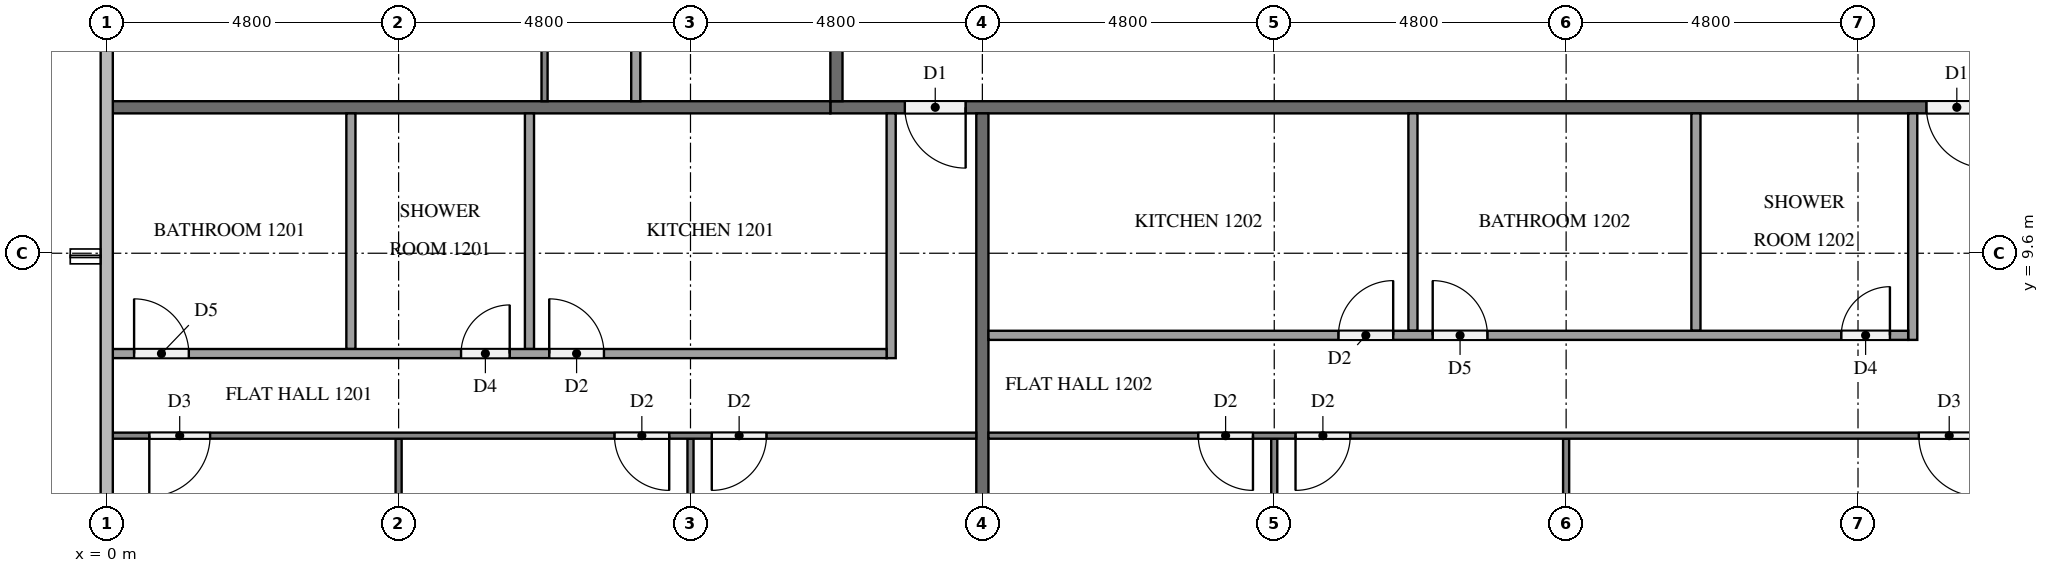
"""IFC4 building model, lengths in metres.
Left out: names, types, materials, properties, quantities, classifications, styles, units other than length and angle.
Written with IfcOpenShell. Run it as: python <this file> out.ifc"""

import sys

from ifc_helpers import new_model, si_unit, direction, frame, frame_2d, origin, place, context, subcontext, project, spatial, rectangle, extrude, element, fill, save


model = new_model("IFC4")
c1 = context("Model", 3, precision=1e-05, world=origin(), true_north=direction((0.0, 1.0)))
c2 = subcontext(c1, "Body", "Model", "MODEL_VIEW")
j1 = project(units=[si_unit("LENGTHUNIT", "METRE"), si_unit("PLANEANGLEUNIT", "RADIAN")], contexts=[c1])
p1 = place(None, origin())
s1 = spatial("IfcSite", under=j1, at=p1, CompositionType="ELEMENT")
p2 = place(p1, origin())
s2 = spatial("IfcBuilding", under=s1, at=p2, CompositionType="ELEMENT")
p3 = place(p2, frame((0.0, 0.0, 50.4)))
s3 = spatial("IfcBuildingStorey", under=s2, at=p3, CompositionType="ELEMENT", Elevation=50.4)
p4 = place(p3, frame((50.5, 12.0, 0.0), z_axis=(0.0, 0.0, 1.0), x_axis=(-1.0, 0.0, 0.0)))
e1 = element("IfcWall", 1, at=p4, inside=s3, PredefinedType="PARTITIONING", context=c2, shape_type="SweptSolid", body=[
    extrude(rectangle(XDim=38.6, YDim=0.2, at=frame_2d((19.3, 0.0))), origin(), (0.0, 0.0, 1.0), 3.1),
])
p5 = place(p4, frame((36.375, 0.0, 0.0)))
e2 = element("IfcOpeningElement", 2, at=p5, cuts=e1, PredefinedType="OPENING", context=c2, shape_type="SweptSolid", body=[
    extrude(rectangle(XDim=1.0, YDim=2.1, at=frame_2d((0.5, 1.05))), frame((0.0, 0.11, 0.0), z_axis=(0.0, -1.0, 0.0), x_axis=(1.0, 0.0, 0.0)), (0.0, 0.0, 1.0), 0.22),
])
p6 = place(p4, frame((19.575, 0.0, 0.0)))
e3 = element("IfcOpeningElement", 3, at=p6, cuts=e1, PredefinedType="OPENING", context=c2, shape_type="SweptSolid", body=[
    extrude(rectangle(XDim=1.0, YDim=2.1, at=frame_2d((0.5, 1.05))), frame((0.0, 0.11, 0.0), z_axis=(0.0, -1.0, 0.0), x_axis=(1.0, 0.0, 0.0)), (0.0, 0.0, 1.0), 0.22),
])
p7 = place(p4, frame((7.575, 0.0, 0.0)))
e4 = element("IfcOpeningElement", 4, at=p7, cuts=e1, PredefinedType="OPENING", context=c2, shape_type="SweptSolid", body=[
    extrude(rectangle(XDim=1.0, YDim=2.1, at=frame_2d((0.5, 1.05))), frame((0.0, 0.11, 0.0), z_axis=(0.0, -1.0, 0.0), x_axis=(1.0, 0.0, 0.0)), (0.0, 0.0, 1.0), 0.22),
])
p8 = place(p4, frame((0.375, 0.0, 0.0)))
e5 = element("IfcOpeningElement", 5, at=p8, cuts=e1, PredefinedType="OPENING", context=c2, shape_type="SweptSolid", body=[
    extrude(rectangle(XDim=1.0, YDim=2.1, at=frame_2d((0.5, 1.05))), frame((0.0, 0.11, 0.0), z_axis=(0.0, -1.0, 0.0), x_axis=(1.0, 0.0, 0.0)), (0.0, 0.0, 1.0), 0.22),
])
p9 = place(p3, frame((12.0, 12.1, 0.0), z_axis=(0.0, 0.0, 1.0), x_axis=(0.0, 1.0, 0.0)))
e6 = element("IfcWall", 6, at=p9, inside=s3, PredefinedType="PARTITIONING", context=c2, shape_type="SweptSolid", body=[
    extrude(rectangle(XDim=28.6, YDim=0.2, at=frame_2d((14.3, 0.0))), origin(), (0.0, 0.0, 1.0), 3.1),
])
p10 = place(p9, frame((12.175, 0.0, 0.0)))
e7 = element("IfcOpeningElement", 7, at=p10, cuts=e6, PredefinedType="OPENING", context=c2, shape_type="SweptSolid", body=[
    extrude(rectangle(XDim=1.0, YDim=2.1, at=frame_2d((0.5, 1.05))), frame((0.0, 0.11, 0.0), z_axis=(0.0, -1.0, 0.0), x_axis=(1.0, 0.0, 0.0)), (0.0, 0.0, 1.0), 0.22),
])
p11 = place(p9, frame((10.625, 0.0, 0.0)))
e8 = element("IfcOpeningElement", 8, at=p11, cuts=e6, PredefinedType="OPENING", context=c2, shape_type="SweptSolid", body=[
    extrude(rectangle(XDim=1.0, YDim=2.1, at=frame_2d((0.5, 1.05))), frame((0.0, 0.11, 0.0), z_axis=(0.0, -1.0, 0.0), x_axis=(1.0, 0.0, 0.0)), (0.0, 0.0, 1.0), 0.22),
])
p12 = place(p3, frame((14.4, 11.9, 0.0), z_axis=(0.0, 0.0, 1.0), x_axis=(0.0, -1.0, 0.0)))
e9 = element("IfcWall", 9, at=p12, inside=s3, PredefinedType="PARTITIONING", context=c2, shape_type="SweptSolid", body=[
    extrude(rectangle(XDim=11.45, YDim=0.2, at=frame_2d((5.725, 0.0))), origin(), (0.0, 0.0, 1.0), 3.1),
])
p13 = place(p3, frame((0.1, 12.0, 0.0), z_axis=(0.0, 0.0, 1.0), x_axis=(1.0, 0.0, 0.0)))
e10 = element("IfcWall", 10, at=p13, inside=s3, PredefinedType="PARTITIONING", context=c2, shape_type="SweptSolid", body=[
    extrude(rectangle(XDim=11.8, YDim=0.2, at=frame_2d((5.9, 0.0))), origin(), (0.0, 0.0, 1.0), 3.1),
])
p14 = place(p3, frame((9.6, 6.55, 0.0), z_axis=(0.0, 0.0, 1.0), x_axis=(0.0, -1.0, 0.0)))
e11 = element("IfcWall", 11, at=p14, inside=s3, PredefinedType="PARTITIONING", context=c2, shape_type="SweptSolid", body=[
    extrude(rectangle(XDim=6.45, YDim=0.1, at=frame_2d((3.225, 0.0))), origin(), (0.0, 0.0, 1.0), 3.1),
])
p15 = place(p3, frame((4.8, 6.55, 0.0), z_axis=(0.0, 0.0, 1.0), x_axis=(0.0, -1.0, 0.0)))
e12 = element("IfcWall", 12, at=p15, inside=s3, PredefinedType="PARTITIONING", context=c2, shape_type="SweptSolid", body=[
    extrude(rectangle(XDim=5.925, YDim=0.1, at=frame_2d((2.962, 0.0))), origin(), (0.0, 0.0, 1.0), 3.1),
])
p16 = place(p3, frame((14.3, 6.6, 0.0), z_axis=(0.0, 0.0, 1.0), x_axis=(-1.0, 0.0, 0.0)))
e13 = element("IfcWall", 13, at=p16, inside=s3, PredefinedType="PARTITIONING", context=c2, shape_type="SweptSolid", body=[
    extrude(rectangle(XDim=14.2, YDim=0.1, at=frame_2d((7.1, 0.0))), origin(), (0.0, 0.0, 1.0), 3.1),
])
p17 = place(p16, frame((3.45, 0.0, 0.0)))
e14 = element("IfcOpeningElement", 14, at=p17, cuts=e13, PredefinedType="OPENING", context=c2, shape_type="SweptSolid", body=[
    extrude(rectangle(XDim=0.9, YDim=2.1, at=frame_2d((0.45, 1.05))), frame((0.0, 0.06, 0.0), z_axis=(0.0, -1.0, 0.0), x_axis=(1.0, 0.0, 0.0)), (0.0, 0.0, 1.0), 0.12),
])
p18 = place(p16, frame((5.05, 0.0, 0.0)))
e15 = element("IfcOpeningElement", 15, at=p18, cuts=e13, PredefinedType="OPENING", context=c2, shape_type="SweptSolid", body=[
    extrude(rectangle(XDim=0.9, YDim=2.1, at=frame_2d((0.45, 1.05))), frame((0.0, 0.06, 0.0), z_axis=(0.0, -1.0, 0.0), x_axis=(1.0, 0.0, 0.0)), (0.0, 0.0, 1.0), 0.12),
])
p19 = place(p16, frame((12.6, 0.0, 0.0)))
e16 = element("IfcOpeningElement", 16, at=p19, cuts=e13, PredefinedType="OPENING", context=c2, shape_type="SweptSolid", body=[
    extrude(rectangle(XDim=1.0, YDim=2.1, at=frame_2d((0.5, 1.05))), frame((0.0, 0.06, 0.0), z_axis=(0.0, -1.0, 0.0), x_axis=(1.0, 0.0, 0.0)), (0.0, 0.0, 1.0), 0.12),
])
for number, where, z_axis, x_axis in (
    (17, (6.952, 11.9, 0.0), (0.0, 0.0, 1.0), (0.0, -1.0, 0.0)),
    (18, (4.015, 11.9, 0.0), (0.0, 0.0, 1.0), (0.0, -1.0, 0.0)),
):
    element("IfcWall", number, at=place(p3, frame(where, z_axis=z_axis, x_axis=x_axis)), inside=s3, PredefinedType="PARTITIONING", context=c2, shape_type="SweptSolid", body=[
        extrude(rectangle(XDim=3.875, YDim=0.15, at=frame_2d((1.938, 0.0))), origin(), (0.0, 0.0, 1.0), 3.1),
    ])
p20 = place(p3, frame((12.9, 11.9, 0.0), z_axis=(0.0, 0.0, 1.0), x_axis=(0.0, -1.0, 0.0)))
e19 = element("IfcWall", 19, at=p20, inside=s3, PredefinedType="PARTITIONING", context=c2, shape_type="SweptSolid", body=[
    extrude(rectangle(XDim=4.025, YDim=0.15, at=frame_2d((2.012, 0.0))), origin(), (0.0, 0.0, 1.0), 3.1),
])
p21 = place(p3, frame((0.1, 7.95, 0.0), z_axis=(0.0, 0.0, 1.0), x_axis=(1.0, 0.0, 0.0)))
e20 = element("IfcWall", 20, at=p21, inside=s3, PredefinedType="PARTITIONING", context=c2, shape_type="SweptSolid", body=[
    extrude(rectangle(XDim=12.725, YDim=0.15, at=frame_2d((6.362, 0.0))), origin(), (0.0, 0.0, 1.0), 3.1),
])
p22 = place(p21, frame((7.177, 0.0, 0.0)))
e21 = element("IfcOpeningElement", 21, at=p22, cuts=e20, PredefinedType="OPENING", context=c2, shape_type="SweptSolid", body=[
    extrude(rectangle(XDim=0.9, YDim=2.1, at=frame_2d((0.45, 1.05))), frame((0.0, 0.085, 0.0), z_axis=(0.0, -1.0, 0.0), x_axis=(1.0, 0.0, 0.0)), (0.0, 0.0, 1.0), 0.17),
])
p23 = place(p21, frame((5.727, 0.0, 0.0)))
e22 = element("IfcOpeningElement", 22, at=p23, cuts=e20, PredefinedType="OPENING", context=c2, shape_type="SweptSolid", body=[
    extrude(rectangle(XDim=0.8, YDim=2.1, at=frame_2d((0.4, 1.05))), frame((0.0, 0.085, 0.0), z_axis=(0.0, -1.0, 0.0), x_axis=(1.0, 0.0, 0.0)), (0.0, 0.0, 1.0), 0.17),
])
p24 = place(p21, frame((0.35, 0.0, 0.0)))
e23 = element("IfcOpeningElement", 23, at=p24, cuts=e20, PredefinedType="OPENING", context=c2, shape_type="SweptSolid", body=[
    extrude(rectangle(XDim=0.9, YDim=2.1, at=frame_2d((0.45, 1.05))), frame((0.0, 0.085, 0.0), z_axis=(0.0, -1.0, 0.0), x_axis=(1.0, 0.0, 0.0)), (0.0, 0.0, 1.0), 0.17),
])
p25 = place(p3, frame((24.0, 6.55, 0.0), z_axis=(0.0, 0.0, 1.0), x_axis=(0.0, -1.0, 0.0)))
e24 = element("IfcWall", 24, at=p25, inside=s3, PredefinedType="PARTITIONING", context=c2, shape_type="SweptSolid", body=[
    extrude(rectangle(XDim=6.1, YDim=0.1, at=frame_2d((3.05, 0.0))), origin(), (0.0, 0.0, 1.0), 3.1),
])
p26 = place(p3, frame((19.2, 6.55, 0.0), z_axis=(0.0, 0.0, 1.0), x_axis=(0.0, -1.0, 0.0)))
e25 = element("IfcWall", 25, at=p26, inside=s3, PredefinedType="PARTITIONING", context=c2, shape_type="SweptSolid", body=[
    extrude(rectangle(XDim=6.45, YDim=0.1, at=frame_2d((3.225, 0.0))), origin(), (0.0, 0.0, 1.0), 3.1),
])
p27 = place(p3, frame((31.1, 6.6, 0.0), z_axis=(0.0, 0.0, 1.0), x_axis=(-1.0, 0.0, 0.0)))
e26 = element("IfcWall", 26, at=p27, inside=s3, PredefinedType="PARTITIONING", context=c2, shape_type="SweptSolid", body=[
    extrude(rectangle(XDim=16.6, YDim=0.1, at=frame_2d((8.3, 0.0))), origin(), (0.0, 0.0, 1.0), 3.1),
])
p28 = place(p27, frame((0.3, 0.0, 0.0)))
e27 = element("IfcOpeningElement", 27, at=p28, cuts=e26, PredefinedType="OPENING", context=c2, shape_type="SweptSolid", body=[
    extrude(rectangle(XDim=1.0, YDim=2.1, at=frame_2d((0.5, 1.05))), frame((0.0, 0.06, 0.0), z_axis=(0.0, -1.0, 0.0), x_axis=(1.0, 0.0, 0.0)), (0.0, 0.0, 1.0), 0.12),
])
p29 = place(p27, frame((10.65, 0.0, 0.0)))
e28 = element("IfcOpeningElement", 28, at=p29, cuts=e26, PredefinedType="OPENING", context=c2, shape_type="SweptSolid", body=[
    extrude(rectangle(XDim=0.9, YDim=2.1, at=frame_2d((0.45, 1.05))), frame((0.0, 0.06, 0.0), z_axis=(0.0, -1.0, 0.0), x_axis=(1.0, 0.0, 0.0)), (0.0, 0.0, 1.0), 0.12),
])
p30 = place(p27, frame((12.25, 0.0, 0.0)))
e29 = element("IfcOpeningElement", 29, at=p30, cuts=e26, PredefinedType="OPENING", context=c2, shape_type="SweptSolid", body=[
    extrude(rectangle(XDim=0.9, YDim=2.1, at=frame_2d((0.45, 1.05))), frame((0.0, 0.06, 0.0), z_axis=(0.0, -1.0, 0.0), x_axis=(1.0, 0.0, 0.0)), (0.0, 0.0, 1.0), 0.12),
])
for number, where, z_axis, x_axis in (
    (30, (26.135, 11.9, 0.0), (0.0, 0.0, 1.0), (0.0, -1.0, 0.0)),
    (31, (21.481, 11.9, 0.0), (0.0, 0.0, 1.0), (0.0, -1.0, 0.0)),
):
    element("IfcWall", number, at=place(p3, frame(where, z_axis=z_axis, x_axis=x_axis)), inside=s3, PredefinedType="PARTITIONING", context=c2, shape_type="SweptSolid", body=[
        extrude(rectangle(XDim=3.575, YDim=0.15, at=frame_2d((1.788, 0.0))), origin(), (0.0, 0.0, 1.0), 3.1),
    ])
p31 = place(p3, frame((29.7, 11.9, 0.0), z_axis=(0.0, 0.0, 1.0), x_axis=(0.0, -1.0, 0.0)))
e32 = element("IfcWall", 32, at=p31, inside=s3, PredefinedType="PARTITIONING", context=c2, shape_type="SweptSolid", body=[
    extrude(rectangle(XDim=3.725, YDim=0.15, at=frame_2d((1.862, 0.0))), origin(), (0.0, 0.0, 1.0), 3.1),
])
p32 = place(p3, frame((14.5, 8.25, 0.0), z_axis=(0.0, 0.0, 1.0), x_axis=(1.0, 0.0, 0.0)))
e33 = element("IfcWall", 33, at=p32, inside=s3, PredefinedType="PARTITIONING", context=c2, shape_type="SweptSolid", body=[
    extrude(rectangle(XDim=15.125, YDim=0.15, at=frame_2d((7.562, 0.0))), origin(), (0.0, 0.0, 1.0), 3.1),
])
p33 = place(p32, frame((14.025, 0.0, 0.0)))
e34 = element("IfcOpeningElement", 34, at=p33, cuts=e33, PredefinedType="OPENING", context=c2, shape_type="SweptSolid", body=[
    extrude(rectangle(XDim=0.8, YDim=2.1, at=frame_2d((0.4, 1.05))), frame((0.0, 0.085, 0.0), z_axis=(0.0, -1.0, 0.0), x_axis=(1.0, 0.0, 0.0)), (0.0, 0.0, 1.0), 0.17),
])
p34 = place(p32, frame((7.306, 0.0, 0.0)))
e35 = element("IfcOpeningElement", 35, at=p34, cuts=e33, PredefinedType="OPENING", context=c2, shape_type="SweptSolid", body=[
    extrude(rectangle(XDim=0.9, YDim=2.1, at=frame_2d((0.45, 1.05))), frame((0.0, 0.085, 0.0), z_axis=(0.0, -1.0, 0.0), x_axis=(1.0, 0.0, 0.0)), (0.0, 0.0, 1.0), 0.17),
])
p35 = place(p32, frame((5.756, 0.0, 0.0)))
e36 = element("IfcOpeningElement", 36, at=p35, cuts=e33, PredefinedType="OPENING", context=c2, shape_type="SweptSolid", body=[
    extrude(rectangle(XDim=0.9, YDim=2.1, at=frame_2d((0.45, 1.05))), frame((0.0, 0.085, 0.0), z_axis=(0.0, -1.0, 0.0), x_axis=(1.0, 0.0, 0.0)), (0.0, 0.0, 1.0), 0.17),
])
p36 = place(p3, frame((7.2, 12.1, 0.0), z_axis=(0.0, 0.0, 1.0), x_axis=(0.0, 1.0, 0.0)))
e37 = element("IfcWall", 37, at=p36, inside=s3, PredefinedType="PARTITIONING", context=c2, shape_type="SweptSolid", body=[
    extrude(rectangle(XDim=11.8, YDim=0.1, at=frame_2d((5.9, 0.0))), origin(), (0.0, 0.0, 1.0), 3.1),
])
p37 = place(p36, frame((5.05, 0.0, 0.0)))
e38 = element("IfcOpeningElement", 38, at=p37, cuts=e37, PredefinedType="OPENING", context=c2, shape_type="SweptSolid", body=[
    extrude(rectangle(XDim=1.0, YDim=2.1, at=frame_2d((0.5, 1.05))), frame((0.0, 0.06, 0.0), z_axis=(0.0, -1.0, 0.0), x_axis=(1.0, 0.0, 0.0)), (0.0, 0.0, 1.0), 0.12),
])
p38 = place(p36, frame((3.45, 0.0, 0.0)))
e39 = element("IfcOpeningElement", 39, at=p38, cuts=e37, PredefinedType="OPENING", context=c2, shape_type="SweptSolid", body=[
    extrude(rectangle(XDim=0.9, YDim=2.1, at=frame_2d((0.45, 1.05))), frame((0.0, 0.06, 0.0), z_axis=(0.0, -1.0, 0.0), x_axis=(1.0, 0.0, 0.0)), (0.0, 0.0, 1.0), 0.12),
])
p39 = place(p3, frame((8.7, 22.425, 0.0), z_axis=(0.0, 0.0, 1.0), x_axis=(0.0, -1.0, 0.0)))
e40 = element("IfcWall", 40, at=p39, inside=s3, PredefinedType="PARTITIONING", context=c2, shape_type="SweptSolid", body=[
    extrude(rectangle(XDim=10.325, YDim=0.15, at=frame_2d((5.163, 0.0))), origin(), (0.0, 0.0, 1.0), 3.1),
])
p40 = place(p39, frame((4.97, 0.0, 0.0)))
e41 = element("IfcOpeningElement", 41, at=p40, cuts=e40, PredefinedType="OPENING", context=c2, shape_type="SweptSolid", body=[
    extrude(rectangle(XDim=0.9, YDim=2.1, at=frame_2d((0.45, 1.05))), frame((0.0, 0.085, 0.0), z_axis=(0.0, -1.0, 0.0), x_axis=(1.0, 0.0, 0.0)), (0.0, 0.0, 1.0), 0.17),
])
p41 = place(p39, frame((6.52, 0.0, 0.0)))
e42 = element("IfcOpeningElement", 42, at=p41, cuts=e40, PredefinedType="OPENING", context=c2, shape_type="SweptSolid", body=[
    extrude(rectangle(XDim=0.8, YDim=2.1, at=frame_2d((0.4, 1.05))), frame((0.0, 0.085, 0.0), z_axis=(0.0, -1.0, 0.0), x_axis=(1.0, 0.0, 0.0)), (0.0, 0.0, 1.0), 0.17),
])
p42 = place(p5, origin())
e43 = element("IfcDoor", 43, at=p42, inside=s3, OperationType="SINGLE_SWING_LEFT", PredefinedType="DOOR", context=c2, shape_type="SweptSolid", body=[
    extrude(rectangle(XDim=1.0, YDim=2.1, at=frame_2d((0.5, 1.05))), frame((0.0, 0.025, 0.0), z_axis=(0.0, -1.0, 0.0), x_axis=(1.0, 0.0, 0.0)), (0.0, 0.0, 1.0), 0.05),
])
fill(e2, e43)
p43 = place(p6, origin())
e44 = element("IfcDoor", 44, at=p43, inside=s3, OperationType="SINGLE_SWING_LEFT", PredefinedType="DOOR", context=c2, shape_type="SweptSolid", body=[
    extrude(rectangle(XDim=1.0, YDim=2.1, at=frame_2d((0.5, 1.05))), frame((0.0, 0.025, 0.0), z_axis=(0.0, -1.0, 0.0), x_axis=(1.0, 0.0, 0.0)), (0.0, 0.0, 1.0), 0.05),
])
fill(e3, e44)
p44 = place(p17, origin())
e45 = element("IfcDoor", 45, at=p44, inside=s3, OperationType="SINGLE_SWING_RIGHT", PredefinedType="DOOR", context=c2, shape_type="SweptSolid", body=[
    extrude(rectangle(XDim=0.9, YDim=2.1, at=frame_2d((0.45, 1.05))), frame((0.0, 0.025, 0.0), z_axis=(0.0, -1.0, 0.0), x_axis=(1.0, 0.0, 0.0)), (0.0, 0.0, 1.0), 0.05),
])
fill(e14, e45)
p45 = place(p18, origin())
e46 = element("IfcDoor", 46, at=p45, inside=s3, OperationType="SINGLE_SWING_LEFT", PredefinedType="DOOR", context=c2, shape_type="SweptSolid", body=[
    extrude(rectangle(XDim=0.9, YDim=2.1, at=frame_2d((0.45, 1.05))), frame((0.0, 0.025, 0.0), z_axis=(0.0, -1.0, 0.0), x_axis=(1.0, 0.0, 0.0)), (0.0, 0.0, 1.0), 0.05),
])
fill(e15, e46)
p46 = place(p19, origin())
e47 = element("IfcDoor", 47, at=p46, inside=s3, OperationType="SINGLE_SWING_RIGHT", PredefinedType="DOOR", context=c2, shape_type="SweptSolid", body=[
    extrude(rectangle(XDim=1.0, YDim=2.1, at=frame_2d((0.5, 1.05))), frame((0.0, 0.025, 0.0), z_axis=(0.0, -1.0, 0.0), x_axis=(1.0, 0.0, 0.0)), (0.0, 0.0, 1.0), 0.05),
])
fill(e16, e47)
p47 = place(p22, origin())
e48 = element("IfcDoor", 48, at=p47, inside=s3, OperationType="SINGLE_SWING_LEFT", PredefinedType="DOOR", context=c2, shape_type="SweptSolid", body=[
    extrude(rectangle(XDim=0.9, YDim=2.1, at=frame_2d((0.45, 1.05))), frame((0.0, 0.025, 0.0), z_axis=(0.0, -1.0, 0.0), x_axis=(1.0, 0.0, 0.0)), (0.0, 0.0, 1.0), 0.05),
])
fill(e21, e48)
p48 = place(p23, origin())
e49 = element("IfcDoor", 49, at=p48, inside=s3, OperationType="SINGLE_SWING_RIGHT", PredefinedType="DOOR", context=c2, shape_type="SweptSolid", body=[
    extrude(rectangle(XDim=0.8, YDim=2.1, at=frame_2d((0.4, 1.05))), frame((0.0, 0.025, 0.0), z_axis=(0.0, -1.0, 0.0), x_axis=(1.0, 0.0, 0.0)), (0.0, 0.0, 1.0), 0.05),
])
fill(e22, e49)
p49 = place(p24, origin())
e50 = element("IfcDoor", 50, at=p49, inside=s3, OperationType="SINGLE_SWING_LEFT", PredefinedType="DOOR", context=c2, shape_type="SweptSolid", body=[
    extrude(rectangle(XDim=0.9, YDim=2.1, at=frame_2d((0.45, 1.05))), frame((0.0, 0.025, 0.0), z_axis=(0.0, -1.0, 0.0), x_axis=(1.0, 0.0, 0.0)), (0.0, 0.0, 1.0), 0.05),
])
fill(e23, e50)
p50 = place(p28, origin())
e51 = element("IfcDoor", 51, at=p50, inside=s3, OperationType="SINGLE_SWING_LEFT", PredefinedType="DOOR", context=c2, shape_type="SweptSolid", body=[
    extrude(rectangle(XDim=1.0, YDim=2.1, at=frame_2d((0.5, 1.05))), frame((0.0, 0.025, 0.0), z_axis=(0.0, -1.0, 0.0), x_axis=(1.0, 0.0, 0.0)), (0.0, 0.0, 1.0), 0.05),
])
fill(e27, e51)
p51 = place(p29, origin())
e52 = element("IfcDoor", 52, at=p51, inside=s3, OperationType="SINGLE_SWING_RIGHT", PredefinedType="DOOR", context=c2, shape_type="SweptSolid", body=[
    extrude(rectangle(XDim=0.9, YDim=2.1, at=frame_2d((0.45, 1.05))), frame((0.0, 0.025, 0.0), z_axis=(0.0, -1.0, 0.0), x_axis=(1.0, 0.0, 0.0)), (0.0, 0.0, 1.0), 0.05),
])
fill(e28, e52)
p52 = place(p30, origin())
e53 = element("IfcDoor", 53, at=p52, inside=s3, OperationType="SINGLE_SWING_LEFT", PredefinedType="DOOR", context=c2, shape_type="SweptSolid", body=[
    extrude(rectangle(XDim=0.9, YDim=2.1, at=frame_2d((0.45, 1.05))), frame((0.0, 0.025, 0.0), z_axis=(0.0, -1.0, 0.0), x_axis=(1.0, 0.0, 0.0)), (0.0, 0.0, 1.0), 0.05),
])
fill(e29, e53)
p53 = place(p33, origin())
e54 = element("IfcDoor", 54, at=p53, inside=s3, OperationType="SINGLE_SWING_RIGHT", PredefinedType="DOOR", context=c2, shape_type="SweptSolid", body=[
    extrude(rectangle(XDim=0.8, YDim=2.1, at=frame_2d((0.4, 1.05))), frame((0.0, 0.025, 0.0), z_axis=(0.0, -1.0, 0.0), x_axis=(1.0, 0.0, 0.0)), (0.0, 0.0, 1.0), 0.05),
])
fill(e34, e54)
p54 = place(p34, origin())
e55 = element("IfcDoor", 55, at=p54, inside=s3, OperationType="SINGLE_SWING_LEFT", PredefinedType="DOOR", context=c2, shape_type="SweptSolid", body=[
    extrude(rectangle(XDim=0.9, YDim=2.1, at=frame_2d((0.45, 1.05))), frame((0.0, 0.025, 0.0), z_axis=(0.0, -1.0, 0.0), x_axis=(1.0, 0.0, 0.0)), (0.0, 0.0, 1.0), 0.05),
])
fill(e35, e55)
p55 = place(p35, origin())
e56 = element("IfcDoor", 56, at=p55, inside=s3, OperationType="SINGLE_SWING_RIGHT", PredefinedType="DOOR", context=c2, shape_type="SweptSolid", body=[
    extrude(rectangle(XDim=0.9, YDim=2.1, at=frame_2d((0.45, 1.05))), frame((0.0, 0.025, 0.0), z_axis=(0.0, -1.0, 0.0), x_axis=(1.0, 0.0, 0.0)), (0.0, 0.0, 1.0), 0.05),
])
fill(e36, e56)
save(model, sys.argv[1])
